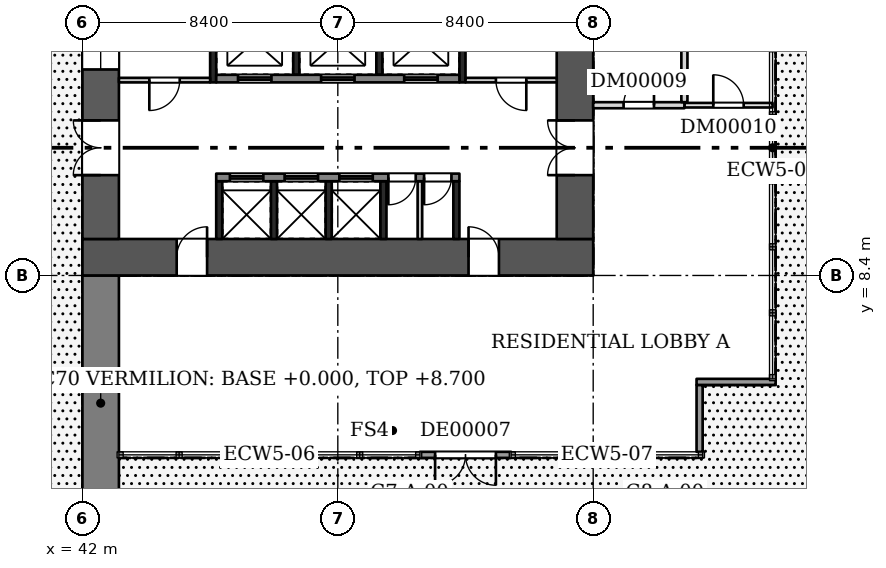
"""IFC4 building model, lengths in metres.
Left out: names, types, materials, properties, quantities, classifications, styles, units other than length and angle.
Written with IfcOpenShell. Run it as: python <this file> out.ifc"""

import sys

from ifc_helpers import new_model, si_unit, direction, frame, frame_2d, origin, place, context, subcontext, project, spatial, rectangle, extrude, element, fill, save


model = new_model("IFC4")
c1 = context("Model", 3, precision=1e-05, world=origin(), true_north=direction((0.0, 1.0)))
c2 = subcontext(c1, "Body", "Model", "MODEL_VIEW")
j1 = project(units=[si_unit("LENGTHUNIT", "METRE"), si_unit("PLANEANGLEUNIT", "RADIAN")], contexts=[c1])
p1 = place(None, origin())
s1 = spatial("IfcSite", under=j1, at=p1, CompositionType="ELEMENT")
p2 = place(p1, origin())
s2 = spatial("IfcBuilding", under=s1, at=p2, CompositionType="ELEMENT")
p3 = place(p2, origin())
s3 = spatial("IfcBuildingStorey", under=s2, at=p3, CompositionType="ELEMENT", Elevation=0.0)
p4 = place(p3, frame((42.6, 0.0, 0.0), z_axis=(0.0, 0.0, 1.0), x_axis=(0.0, 1.0, 0.0)))
e1 = element("IfcWall", 1, at=p4, inside=s3, PredefinedType="SHEAR", context=c2, shape_type="SweptSolid", body=[
    extrude(rectangle(XDim=8.4, YDim=1.2, at=frame_2d((4.2, 0.0))), origin(), (0.0, 0.0, 1.0), 8.7),
])
p5 = place(p3, frame((42.0, 9.0, 0.0), z_axis=(0.0, 0.0, 1.0), x_axis=(1.0, 0.0, 0.0)))
e2 = element("IfcWall", 2, at=p5, inside=s3, PredefinedType="SHEAR", context=c2, shape_type="SweptSolid", body=[
    extrude(rectangle(XDim=16.8, YDim=1.2, at=frame_2d((8.4, 0.0))), origin(), (0.0, 0.0, 1.0), 8.7),
])
p6 = place(p5, frame((3.1, 0.0, 0.0)))
e3 = element("IfcOpeningElement", 3, at=p6, cuts=e2, PredefinedType="OPENING", context=c2, shape_type="SweptSolid", body=[
    extrude(rectangle(XDim=1.0, YDim=2.1, at=frame_2d((0.5, 1.05))), frame((0.0, 0.61, 0.0), z_axis=(0.0, -1.0, 0.0), x_axis=(1.0, 0.0, 0.0)), (0.0, 0.0, 1.0), 1.22),
])
p7 = place(p5, frame((12.7, 0.0, 0.0)))
e4 = element("IfcOpeningElement", 4, at=p7, cuts=e2, PredefinedType="OPENING", context=c2, shape_type="SweptSolid", body=[
    extrude(rectangle(XDim=1.0, YDim=2.1, at=frame_2d((0.5, 1.05))), frame((0.0, 0.61, 0.0), z_axis=(0.0, -1.0, 0.0), x_axis=(1.0, 0.0, 0.0)), (0.0, 0.0, 1.0), 1.22),
])
p8 = place(p3, frame((42.6, 9.6, 0.0), z_axis=(0.0, 0.0, 1.0), x_axis=(0.0, 1.0, 0.0)))
e5 = element("IfcWall", 5, at=p8, inside=s3, PredefinedType="SHEAR", context=c2, shape_type="SweptSolid", body=[
    extrude(rectangle(XDim=14.4, YDim=1.2, at=frame_2d((7.2, 0.0))), origin(), (0.0, 0.0, 1.0), 8.7),
])
p9 = place(p8, frame((2.1, 0.0, 0.0)))
e6 = element("IfcOpeningElement", 6, at=p9, cuts=e5, PredefinedType="OPENING", context=c2, shape_type="SweptSolid", body=[
    extrude(rectangle(XDim=1.8, YDim=2.1, at=frame_2d((0.9, 1.05))), frame((0.0, 0.61, 0.0), z_axis=(0.0, -1.0, 0.0), x_axis=(1.0, 0.0, 0.0)), (0.0, 0.0, 1.0), 1.22),
])
p10 = place(p8, frame((9.1, 0.0, 0.0)))
e7 = element("IfcOpeningElement", 7, at=p10, cuts=e5, PredefinedType="OPENING", context=c2, shape_type="SweptSolid", body=[
    extrude(rectangle(XDim=1.0, YDim=2.1, at=frame_2d((0.5, 1.05))), frame((0.0, 0.61, 0.0), z_axis=(0.0, -1.0, 0.0), x_axis=(1.0, 0.0, 0.0)), (0.0, 0.0, 1.0), 1.22),
])
p11 = place(p8, frame((5.575, 0.0, 0.6)))
e8 = element("IfcOpeningElement", 8, at=p11, cuts=e5, PredefinedType="OPENING", context=c2, shape_type="SweptSolid", body=[
    extrude(rectangle(XDim=3.0, YDim=2.1, at=frame_2d((1.5, 1.05))), frame((0.0, 0.61, 0.0), z_axis=(0.0, -1.0, 0.0), x_axis=(1.0, 0.0, 0.0)), (0.0, 0.0, 1.0), 1.22),
])
p12 = place(p8, frame((12.197, 0.0, 0.5)))
e9 = element("IfcOpeningElement", 9, at=p12, cuts=e5, PredefinedType="OPENING", context=c2, shape_type="SweptSolid", body=[
    extrude(rectangle(XDim=1.2, YDim=2.4, at=frame_2d((0.6, 1.2))), frame((0.0, 0.61, 0.0), z_axis=(0.0, -1.0, 0.0), x_axis=(1.0, 0.0, 0.0)), (0.0, 0.0, 1.0), 1.22),
])
p13 = place(p3, frame((58.2, 9.6, 0.0), z_axis=(0.0, 0.0, 1.0), x_axis=(0.0, 1.0, 0.0)))
e10 = element("IfcWall", 10, at=p13, inside=s3, PredefinedType="SHEAR", context=c2, shape_type="SweptSolid", body=[
    extrude(rectangle(XDim=14.4, YDim=1.2, at=frame_2d((7.2, 0.0))), origin(), (0.0, 0.0, 1.0), 8.7),
])
p14 = place(p13, frame((2.1, 0.0, 0.0)))
e11 = element("IfcOpeningElement", 11, at=p14, cuts=e10, PredefinedType="OPENING", context=c2, shape_type="SweptSolid", body=[
    extrude(rectangle(XDim=1.8, YDim=2.1, at=frame_2d((0.9, 1.05))), frame((0.0, 0.61, 0.0), z_axis=(0.0, -1.0, 0.0), x_axis=(1.0, 0.0, 0.0)), (0.0, 0.0, 1.0), 1.22),
])
for number, where, z_axis, x_axis in (
    (12, (46.5, 9.6, 0.0), (0.0, 0.0, 1.0), (0.0, 1.0, 0.0)),
    (13, (48.3, 9.6, 0.0), (0.0, 0.0, 1.0), (0.0, 1.0, 0.0)),
    (14, (50.1, 9.6, 0.0), (0.0, 0.0, 1.0), (0.0, 1.0, 0.0)),
    (15, (51.9, 9.6, 0.0), (0.0, 0.0, 1.0), (0.0, 1.0, 0.0)),
    (16, (54.3, 9.6, 0.0), (0.0, 0.0, 1.0), (0.0, 1.0, 0.0)),
):
    element("IfcWall", number, at=place(p3, frame(where, z_axis=z_axis, x_axis=x_axis)), inside=s3, PredefinedType="SHEAR", context=c2, shape_type="SweptSolid", body=[
        extrude(rectangle(XDim=1.9, YDim=0.2, at=frame_2d((0.95, 0.0))), origin(), (0.0, 0.0, 1.0), 8.7),
    ])
p15 = place(p3, frame((53.1, 9.6, 0.0), z_axis=(0.0, 0.0, 1.0), x_axis=(0.0, 1.0, 0.0)))
e17 = element("IfcWall", 17, at=p15, inside=s3, PredefinedType="PARTITIONING", context=c2, shape_type="SweptSolid", body=[
    extrude(rectangle(XDim=1.9, YDim=0.15, at=frame_2d((0.95, 0.0))), origin(), (0.0, 0.0, 1.0), 8.7),
])
p16 = place(p3, frame((46.4, 11.625, 0.0), z_axis=(0.0, 0.0, 1.0), x_axis=(1.0, 0.0, 0.0)))
e18 = element("IfcWall", 18, at=p16, inside=s3, PredefinedType="SHEAR", context=c2, shape_type="SweptSolid", body=[
    extrude(rectangle(XDim=8.0, YDim=0.25, at=frame_2d((4.0, 0.0))), origin(), (0.0, 0.0, 1.0), 8.7),
])
p17 = place(p16, frame((0.45, 0.0, 0.0)))
e19 = element("IfcOpeningElement", 19, at=p17, cuts=e18, PredefinedType="OPENING", context=c2, shape_type="SweptSolid", body=[
    extrude(rectangle(XDim=1.1, YDim=2.1, at=frame_2d((0.55, 1.05))), frame((0.0, 0.135, 0.0), z_axis=(0.0, -1.0, 0.0), x_axis=(1.0, 0.0, 0.0)), (0.0, 0.0, 1.0), 0.27),
])
p18 = place(p16, frame((2.25, 0.0, 0.0)))
e20 = element("IfcOpeningElement", 20, at=p18, cuts=e18, PredefinedType="OPENING", context=c2, shape_type="SweptSolid", body=[
    extrude(rectangle(XDim=1.1, YDim=2.1, at=frame_2d((0.55, 1.05))), frame((0.0, 0.135, 0.0), z_axis=(0.0, -1.0, 0.0), x_axis=(1.0, 0.0, 0.0)), (0.0, 0.0, 1.0), 0.27),
])
p19 = place(p16, frame((4.05, 0.0, 0.0)))
e21 = element("IfcOpeningElement", 21, at=p19, cuts=e18, PredefinedType="OPENING", context=c2, shape_type="SweptSolid", body=[
    extrude(rectangle(XDim=1.1, YDim=2.1, at=frame_2d((0.55, 1.05))), frame((0.0, 0.135, 0.0), z_axis=(0.0, -1.0, 0.0), x_axis=(1.0, 0.0, 0.0)), (0.0, 0.0, 1.0), 0.27),
])
p20 = place(p16, frame((5.663, 0.0, 0.0)))
e22 = element("IfcOpeningElement", 22, at=p20, cuts=e18, PredefinedType="OPENING", context=c2, shape_type="SweptSolid", body=[
    extrude(rectangle(XDim=0.9, YDim=2.1, at=frame_2d((0.45, 1.05))), frame((0.0, 0.135, 0.0), z_axis=(0.0, -1.0, 0.0), x_axis=(1.0, 0.0, 0.0)), (0.0, 0.0, 1.0), 0.27),
])
p21 = place(p16, frame((6.837, 0.0, 0.0)))
e23 = element("IfcOpeningElement", 23, at=p21, cuts=e18, PredefinedType="OPENING", context=c2, shape_type="SweptSolid", body=[
    extrude(rectangle(XDim=0.9, YDim=2.1, at=frame_2d((0.45, 1.05))), frame((0.0, 0.135, 0.0), z_axis=(0.0, -1.0, 0.0), x_axis=(1.0, 0.0, 0.0)), (0.0, 0.0, 1.0), 0.27),
])
for number, where, z_axis, x_axis in (
    (24, (49.033, 15.0, 0.0), (0.0, 0.0, 1.0), (0.0, 1.0, 0.0)),
    (25, (51.767, 15.0, 0.0), (0.0, 0.0, 1.0), (0.0, 1.0, 0.0)),
):
    element("IfcWall", number, at=place(p3, frame(where, z_axis=z_axis, x_axis=x_axis)), inside=s3, PredefinedType="SHEAR", context=c2, shape_type="SweptSolid", body=[
        extrude(rectangle(XDim=1.9, YDim=0.2, at=frame_2d((0.95, 0.0))), origin(), (0.0, 0.0, 1.0), 8.7),
    ])
p22 = place(p3, frame((46.4, 14.875, 0.0), z_axis=(0.0, 0.0, 1.0), x_axis=(1.0, 0.0, 0.0)))
e26 = element("IfcWall", 26, at=p22, inside=s3, PredefinedType="SHEAR", context=c2, shape_type="SweptSolid", body=[
    extrude(rectangle(XDim=8.0, YDim=0.25, at=frame_2d((4.0, 0.0))), origin(), (0.0, 0.0, 1.0), 8.7),
])
p23 = place(p22, frame((0.717, 0.0, 0.0)))
e27 = element("IfcOpeningElement", 27, at=p23, cuts=e26, PredefinedType="OPENING", context=c2, shape_type="SweptSolid", body=[
    extrude(rectangle(XDim=1.1, YDim=2.1, at=frame_2d((0.55, 1.05))), frame((0.0, 0.135, 0.0), z_axis=(0.0, -1.0, 0.0), x_axis=(1.0, 0.0, 0.0)), (0.0, 0.0, 1.0), 0.27),
])
p24 = place(p22, frame((3.45, 0.0, 0.0)))
e28 = element("IfcOpeningElement", 28, at=p24, cuts=e26, PredefinedType="OPENING", context=c2, shape_type="SweptSolid", body=[
    extrude(rectangle(XDim=1.1, YDim=2.1, at=frame_2d((0.55, 1.05))), frame((0.0, 0.135, 0.0), z_axis=(0.0, -1.0, 0.0), x_axis=(1.0, 0.0, 0.0)), (0.0, 0.0, 1.0), 0.27),
])
p25 = place(p22, frame((6.183, 0.0, 0.0)))
e29 = element("IfcOpeningElement", 29, at=p25, cuts=e26, PredefinedType="OPENING", context=c2, shape_type="SweptSolid", body=[
    extrude(rectangle(XDim=1.1, YDim=2.1, at=frame_2d((0.55, 1.05))), frame((0.0, 0.135, 0.0), z_axis=(0.0, -1.0, 0.0), x_axis=(1.0, 0.0, 0.0)), (0.0, 0.0, 1.0), 0.27),
])
p26 = place(p3, frame((46.3, 14.75, 0.0), z_axis=(0.0, 0.0, 1.0), x_axis=(0.0, 1.0, 0.0)))
e30 = element("IfcWall", 30, at=p26, inside=s3, PredefinedType="SHEAR", context=c2, shape_type="SweptSolid", body=[
    extrude(rectangle(XDim=2.4, YDim=0.2, at=frame_2d((1.2, 0.0))), origin(), (0.0, 0.0, 1.0), 8.7),
])
p27 = place(p3, frame((43.2, 14.825, 0.0), z_axis=(0.0, 0.0, 1.0), x_axis=(1.0, 0.0, 0.0)))
e31 = element("IfcWall", 31, at=p27, inside=s3, PredefinedType="PARTITIONING", context=c2, shape_type="SweptSolid", body=[
    extrude(rectangle(XDim=3.0, YDim=0.15, at=frame_2d((1.5, 0.0))), origin(), (0.0, 0.0, 1.0), 8.7),
])
p28 = place(p27, frame((1.0, 0.0, 0.0)))
e32 = element("IfcOpeningElement", 32, at=p28, cuts=e31, PredefinedType="OPENING", context=c2, shape_type="SweptSolid", body=[
    extrude(rectangle(XDim=1.0, YDim=2.1, at=frame_2d((0.5, 1.05))), frame((0.0, 0.085, 0.0), z_axis=(0.0, -1.0, 0.0), x_axis=(1.0, 0.0, 0.0)), (0.0, 0.0, 1.0), 0.17),
])
p29 = place(p3, frame((54.5, 14.75, 0.0), z_axis=(0.0, 0.0, 1.0), x_axis=(0.0, 1.0, 0.0)))
e33 = element("IfcWall", 33, at=p29, inside=s3, PredefinedType="SHEAR", context=c2, shape_type="SweptSolid", body=[
    extrude(rectangle(XDim=9.25, YDim=0.2, at=frame_2d((4.625, 0.0))), origin(), (0.0, 0.0, 1.0), 8.7),
])
p30 = place(p3, frame((54.6, 14.825, 0.0), z_axis=(0.0, 0.0, 1.0), x_axis=(1.0, 0.0, 0.0)))
e34 = element("IfcWall", 34, at=p30, inside=s3, PredefinedType="PARTITIONING", context=c2, shape_type="SweptSolid", body=[
    extrude(rectangle(XDim=3.0, YDim=0.15, at=frame_2d((1.5, 0.0))), origin(), (0.0, 0.0, 1.0), 8.7),
])
p31 = place(p30, frame((1.0, 0.0, 0.0)))
e35 = element("IfcOpeningElement", 35, at=p31, cuts=e34, PredefinedType="OPENING", context=c2, shape_type="SweptSolid", body=[
    extrude(rectangle(XDim=1.0, YDim=2.1, at=frame_2d((0.5, 1.05))), frame((0.0, 0.085, 0.0), z_axis=(0.0, -1.0, 0.0), x_axis=(1.0, 0.0, 0.0)), (0.0, 0.0, 1.0), 0.17),
])
p32 = place(p3, frame((58.8, 14.0, 0.0), z_axis=(0.0, 0.0, 1.0), x_axis=(1.0, 0.0, 0.0)))
e36 = element("IfcWall", 36, at=p32, inside=s3, PredefinedType="PARTITIONING", context=c2, shape_type="SweptSolid", body=[
    extrude(rectangle(XDim=3.0, YDim=0.2, at=frame_2d((1.5, 0.0))), origin(), (0.0, 0.0, 1.0), 8.7),
])
p33 = place(p32, frame((1.0, 0.0, 0.0)))
e37 = element("IfcOpeningElement", 37, at=p33, cuts=e36, PredefinedType="OPENING", context=c2, shape_type="SweptSolid", body=[
    extrude(rectangle(XDim=1.0, YDim=2.1, at=frame_2d((0.5, 1.05))), frame((0.0, 0.11, 0.0), z_axis=(0.0, -1.0, 0.0), x_axis=(1.0, 0.0, 0.0)), (0.0, 0.0, 1.0), 0.22),
])
p34 = place(p3, frame((61.8, 14.1, 0.0), z_axis=(0.0, 0.0, 1.0), x_axis=(0.0, 1.0, 0.0)))
e38 = element("IfcWall", 38, at=p34, inside=s3, PredefinedType="PARTITIONING", context=c2, shape_type="SweptSolid", body=[
    extrude(rectangle(XDim=8.6, YDim=0.2, at=frame_2d((4.3, 0.0))), origin(), (0.0, 0.0, 1.0), 8.7),
])
p35 = place(p3, frame((61.8, 14.0, 0.0), z_axis=(0.0, 0.0, 1.0), x_axis=(1.0, 0.0, 0.0)))
e39 = element("IfcWall", 39, at=p35, inside=s3, PredefinedType="PARTITIONING", context=c2, shape_type="SweptSolid", body=[
    extrude(rectangle(XDim=2.9, YDim=0.15, at=frame_2d((1.45, 0.0))), origin(), (0.0, 0.0, 1.0), 8.7),
])
p36 = place(p35, frame((0.95, 0.0, 0.0)))
e40 = element("IfcOpeningElement", 40, at=p36, cuts=e39, PredefinedType="OPENING", context=c2, shape_type="SweptSolid", body=[
    extrude(rectangle(XDim=1.0, YDim=2.1, at=frame_2d((0.5, 1.05))), frame((0.0, 0.085, 0.0), z_axis=(0.0, -1.0, 0.0), x_axis=(1.0, 0.0, 0.0)), (0.0, 0.0, 1.0), 0.17),
])
p37 = place(p3, frame((53.1, 2.5, 0.0), z_axis=(0.0, 0.0, 1.0), x_axis=(1.0, 0.0, 0.0)))
e41 = element("IfcWall", 41, at=p37, inside=s3, PredefinedType="SOLIDWALL", context=c2, shape_type="SweptSolid", body=[
    extrude(rectangle(XDim=3.0, YDim=0.2, at=frame_2d((1.5, 0.0))), origin(), (0.0, 0.0, 1.0), 8.7),
])
p38 = place(p37, frame((0.5, 0.0, 0.0)))
e42 = element("IfcOpeningElement", 42, at=p38, cuts=e41, PredefinedType="OPENING", context=c2, shape_type="SweptSolid", body=[
    extrude(rectangle(XDim=2.0, YDim=2.4, at=frame_2d((1.0, 1.2))), frame((0.0, 0.11, 0.0), z_axis=(0.0, -1.0, 0.0), x_axis=(1.0, 0.0, 0.0)), (0.0, 0.0, 1.0), 0.22),
])
p39 = place(p3, frame((62.3, 2.6, 0.0), z_axis=(0.0, 0.0, 1.0), x_axis=(0.0, 1.0, 0.0)))
e43 = element("IfcWall", 43, at=p39, inside=s3, PredefinedType="SOLIDWALL", context=c2, shape_type="SweptSolid", body=[
    extrude(rectangle(XDim=2.2, YDim=0.2, at=frame_2d((1.1, 0.0))), origin(), (0.0, 0.0, 1.0), 8.7),
])
p40 = place(p3, frame((62.2, 4.9, 0.0), z_axis=(0.0, 0.0, 1.0), x_axis=(1.0, 0.0, 0.0)))
e44 = element("IfcWall", 44, at=p40, inside=s3, PredefinedType="SOLIDWALL", context=c2, shape_type="SweptSolid", body=[
    extrude(rectangle(XDim=2.6, YDim=0.2, at=frame_2d((1.3, 0.0))), origin(), (0.0, 0.0, 1.0), 8.7),
])
p41 = place(p6, origin())
e45 = element("IfcDoor", 45, at=p41, inside=s3, OperationType="SINGLE_SWING_RIGHT", PredefinedType="DOOR", context=c2, shape_type="SweptSolid", body=[
    extrude(rectangle(XDim=1.0, YDim=2.1, at=frame_2d((0.5, 1.05))), frame((0.0, 0.025, 0.0), z_axis=(0.0, -1.0, 0.0), x_axis=(1.0, 0.0, 0.0)), (0.0, 0.0, 1.0), 0.05),
])
fill(e3, e45)
p42 = place(p7, origin())
e46 = element("IfcDoor", 46, at=p42, inside=s3, OperationType="SINGLE_SWING_LEFT", PredefinedType="DOOR", context=c2, shape_type="SweptSolid", body=[
    extrude(rectangle(XDim=1.0, YDim=2.1, at=frame_2d((0.5, 1.05))), frame((0.0, 0.025, 0.0), z_axis=(0.0, -1.0, 0.0), x_axis=(1.0, 0.0, 0.0)), (0.0, 0.0, 1.0), 0.05),
])
fill(e4, e46)
p43 = place(p9, origin())
e47 = element("IfcDoor", 47, at=p43, inside=s3, OperationType="DOUBLE_DOOR_SINGLE_SWING", PredefinedType="DOOR", context=c2, shape_type="SweptSolid", body=[
    extrude(rectangle(XDim=1.8, YDim=2.1, at=frame_2d((0.9, 1.05))), frame((0.0, 0.025, 0.0), z_axis=(0.0, -1.0, 0.0), x_axis=(1.0, 0.0, 0.0)), (0.0, 0.0, 1.0), 0.05),
])
fill(e6, e47)
p44 = place(p14, origin())
e48 = element("IfcDoor", 48, at=p44, inside=s3, OperationType="DOUBLE_DOOR_SINGLE_SWING", PredefinedType="DOOR", context=c2, shape_type="SweptSolid", body=[
    extrude(rectangle(XDim=1.8, YDim=2.1, at=frame_2d((0.9, 1.05))), frame((0.0, 0.025, 0.0), z_axis=(0.0, -1.0, 0.0), x_axis=(1.0, 0.0, 0.0)), (0.0, 0.0, 1.0), 0.05),
])
fill(e11, e48)
p45 = place(p17, origin())
e49 = element("IfcDoor", 49, at=p45, inside=s3, OperationType="DOUBLE_DOOR_SLIDING", PredefinedType="DOOR", context=c2, shape_type="SweptSolid", body=[
    extrude(rectangle(XDim=1.1, YDim=2.1, at=frame_2d((0.55, 1.05))), frame((0.0, 0.025, 0.0), z_axis=(0.0, -1.0, 0.0), x_axis=(1.0, 0.0, 0.0)), (0.0, 0.0, 1.0), 0.05),
])
fill(e19, e49)
p46 = place(p18, origin())
e50 = element("IfcDoor", 50, at=p46, inside=s3, OperationType="DOUBLE_DOOR_SLIDING", PredefinedType="DOOR", context=c2, shape_type="SweptSolid", body=[
    extrude(rectangle(XDim=1.1, YDim=2.1, at=frame_2d((0.55, 1.05))), frame((0.0, 0.025, 0.0), z_axis=(0.0, -1.0, 0.0), x_axis=(1.0, 0.0, 0.0)), (0.0, 0.0, 1.0), 0.05),
])
fill(e20, e50)
p47 = place(p19, origin())
e51 = element("IfcDoor", 51, at=p47, inside=s3, OperationType="DOUBLE_DOOR_SLIDING", PredefinedType="DOOR", context=c2, shape_type="SweptSolid", body=[
    extrude(rectangle(XDim=1.1, YDim=2.1, at=frame_2d((0.55, 1.05))), frame((0.0, 0.025, 0.0), z_axis=(0.0, -1.0, 0.0), x_axis=(1.0, 0.0, 0.0)), (0.0, 0.0, 1.0), 0.05),
])
fill(e21, e51)
p48 = place(p20, frame((0.9, 0.0, 0.0), z_axis=(0.0, 0.0, 1.0), x_axis=(-1.0, 0.0, 0.0)))
e52 = element("IfcDoor", 52, at=p48, inside=s3, OperationType="SINGLE_SWING_RIGHT", PredefinedType="DOOR", context=c2, shape_type="SweptSolid", body=[
    extrude(rectangle(XDim=0.9, YDim=2.1, at=frame_2d((0.45, 1.05))), frame((0.0, 0.025, 0.0), z_axis=(0.0, -1.0, 0.0), x_axis=(1.0, 0.0, 0.0)), (0.0, 0.0, 1.0), 0.05),
])
fill(e22, e52)
p49 = place(p21, frame((0.9, 0.0, 0.0), z_axis=(0.0, 0.0, 1.0), x_axis=(-1.0, 0.0, 0.0)))
e53 = element("IfcDoor", 53, at=p49, inside=s3, OperationType="SINGLE_SWING_RIGHT", PredefinedType="DOOR", context=c2, shape_type="SweptSolid", body=[
    extrude(rectangle(XDim=0.9, YDim=2.1, at=frame_2d((0.45, 1.05))), frame((0.0, 0.025, 0.0), z_axis=(0.0, -1.0, 0.0), x_axis=(1.0, 0.0, 0.0)), (0.0, 0.0, 1.0), 0.05),
])
fill(e23, e53)
p50 = place(p23, origin())
e54 = element("IfcDoor", 54, at=p50, inside=s3, OperationType="DOUBLE_DOOR_SLIDING", PredefinedType="DOOR", context=c2, shape_type="SweptSolid", body=[
    extrude(rectangle(XDim=1.1, YDim=2.1, at=frame_2d((0.55, 1.05))), frame((0.0, 0.025, 0.0), z_axis=(0.0, -1.0, 0.0), x_axis=(1.0, 0.0, 0.0)), (0.0, 0.0, 1.0), 0.05),
])
fill(e27, e54)
p51 = place(p24, origin())
e55 = element("IfcDoor", 55, at=p51, inside=s3, OperationType="DOUBLE_DOOR_SLIDING", PredefinedType="DOOR", context=c2, shape_type="SweptSolid", body=[
    extrude(rectangle(XDim=1.1, YDim=2.1, at=frame_2d((0.55, 1.05))), frame((0.0, 0.025, 0.0), z_axis=(0.0, -1.0, 0.0), x_axis=(1.0, 0.0, 0.0)), (0.0, 0.0, 1.0), 0.05),
])
fill(e28, e55)
p52 = place(p25, origin())
e56 = element("IfcDoor", 56, at=p52, inside=s3, OperationType="DOUBLE_DOOR_SLIDING", PredefinedType="DOOR", context=c2, shape_type="SweptSolid", body=[
    extrude(rectangle(XDim=1.1, YDim=2.1, at=frame_2d((0.55, 1.05))), frame((0.0, 0.025, 0.0), z_axis=(0.0, -1.0, 0.0), x_axis=(1.0, 0.0, 0.0)), (0.0, 0.0, 1.0), 0.05),
])
fill(e29, e56)
p53 = place(p28, frame((1.0, 0.0, 0.0), z_axis=(0.0, 0.0, 1.0), x_axis=(-1.0, 0.0, 0.0)))
e57 = element("IfcDoor", 57, at=p53, inside=s3, OperationType="SINGLE_SWING_RIGHT", PredefinedType="DOOR", context=c2, shape_type="SweptSolid", body=[
    extrude(rectangle(XDim=1.0, YDim=2.1, at=frame_2d((0.5, 1.05))), frame((0.0, 0.025, 0.0), z_axis=(0.0, -1.0, 0.0), x_axis=(1.0, 0.0, 0.0)), (0.0, 0.0, 1.0), 0.05),
])
fill(e32, e57)
p54 = place(p31, frame((1.0, 0.0, 0.0), z_axis=(0.0, 0.0, 1.0), x_axis=(-1.0, 0.0, 0.0)))
e58 = element("IfcDoor", 58, at=p54, inside=s3, OperationType="SINGLE_SWING_LEFT", PredefinedType="DOOR", context=c2, shape_type="SweptSolid", body=[
    extrude(rectangle(XDim=1.0, YDim=2.1, at=frame_2d((0.5, 1.05))), frame((0.0, 0.025, 0.0), z_axis=(0.0, -1.0, 0.0), x_axis=(1.0, 0.0, 0.0)), (0.0, 0.0, 1.0), 0.05),
])
fill(e35, e58)
p55 = place(p11, origin())
e59 = element("IfcWindow", 59, at=p55, inside=s3, PartitioningType="SINGLE_PANEL", PredefinedType="WINDOW", context=c2, shape_type="SweptSolid", body=[
    extrude(rectangle(XDim=3.0, YDim=2.1, at=frame_2d((1.5, 1.05))), frame((0.0, 0.03, 0.0), z_axis=(0.0, -1.0, 0.0), x_axis=(1.0, 0.0, 0.0)), (0.0, 0.0, 1.0), 0.06),
])
fill(e8, e59)
p56 = place(p33, origin())
e60 = element("IfcDoor", 60, at=p56, inside=s3, OperationType="SINGLE_SWING_RIGHT", PredefinedType="DOOR", context=c2, shape_type="SweptSolid", body=[
    extrude(rectangle(XDim=1.0, YDim=2.1, at=frame_2d((0.5, 1.05))), frame((0.0, 0.025, 0.0), z_axis=(0.0, -1.0, 0.0), x_axis=(1.0, 0.0, 0.0)), (0.0, 0.0, 1.0), 0.05),
])
fill(e37, e60)
p57 = place(p36, origin())
e61 = element("IfcDoor", 61, at=p57, inside=s3, OperationType="SINGLE_SWING_LEFT", PredefinedType="DOOR", context=c2, shape_type="SweptSolid", body=[
    extrude(rectangle(XDim=1.0, YDim=2.1, at=frame_2d((0.5, 1.05))), frame((0.0, 0.025, 0.0), z_axis=(0.0, -1.0, 0.0), x_axis=(1.0, 0.0, 0.0)), (0.0, 0.0, 1.0), 0.05),
])
fill(e40, e61)
p58 = place(p38, frame((2.0, 0.0, 0.0), z_axis=(0.0, 0.0, 1.0), x_axis=(-1.0, 0.0, 0.0)))
e62 = element("IfcDoor", 62, at=p58, inside=s3, OperationType="DOUBLE_DOOR_SINGLE_SWING", PredefinedType="DOOR", context=c2, shape_type="SweptSolid", body=[
    extrude(rectangle(XDim=2.0, YDim=2.4, at=frame_2d((1.0, 1.2))), frame((0.0, 0.025, 0.0), z_axis=(0.0, -1.0, 0.0), x_axis=(1.0, 0.0, 0.0)), (0.0, 0.0, 1.0), 0.05),
])
fill(e42, e62)
save(model, sys.argv[1])
